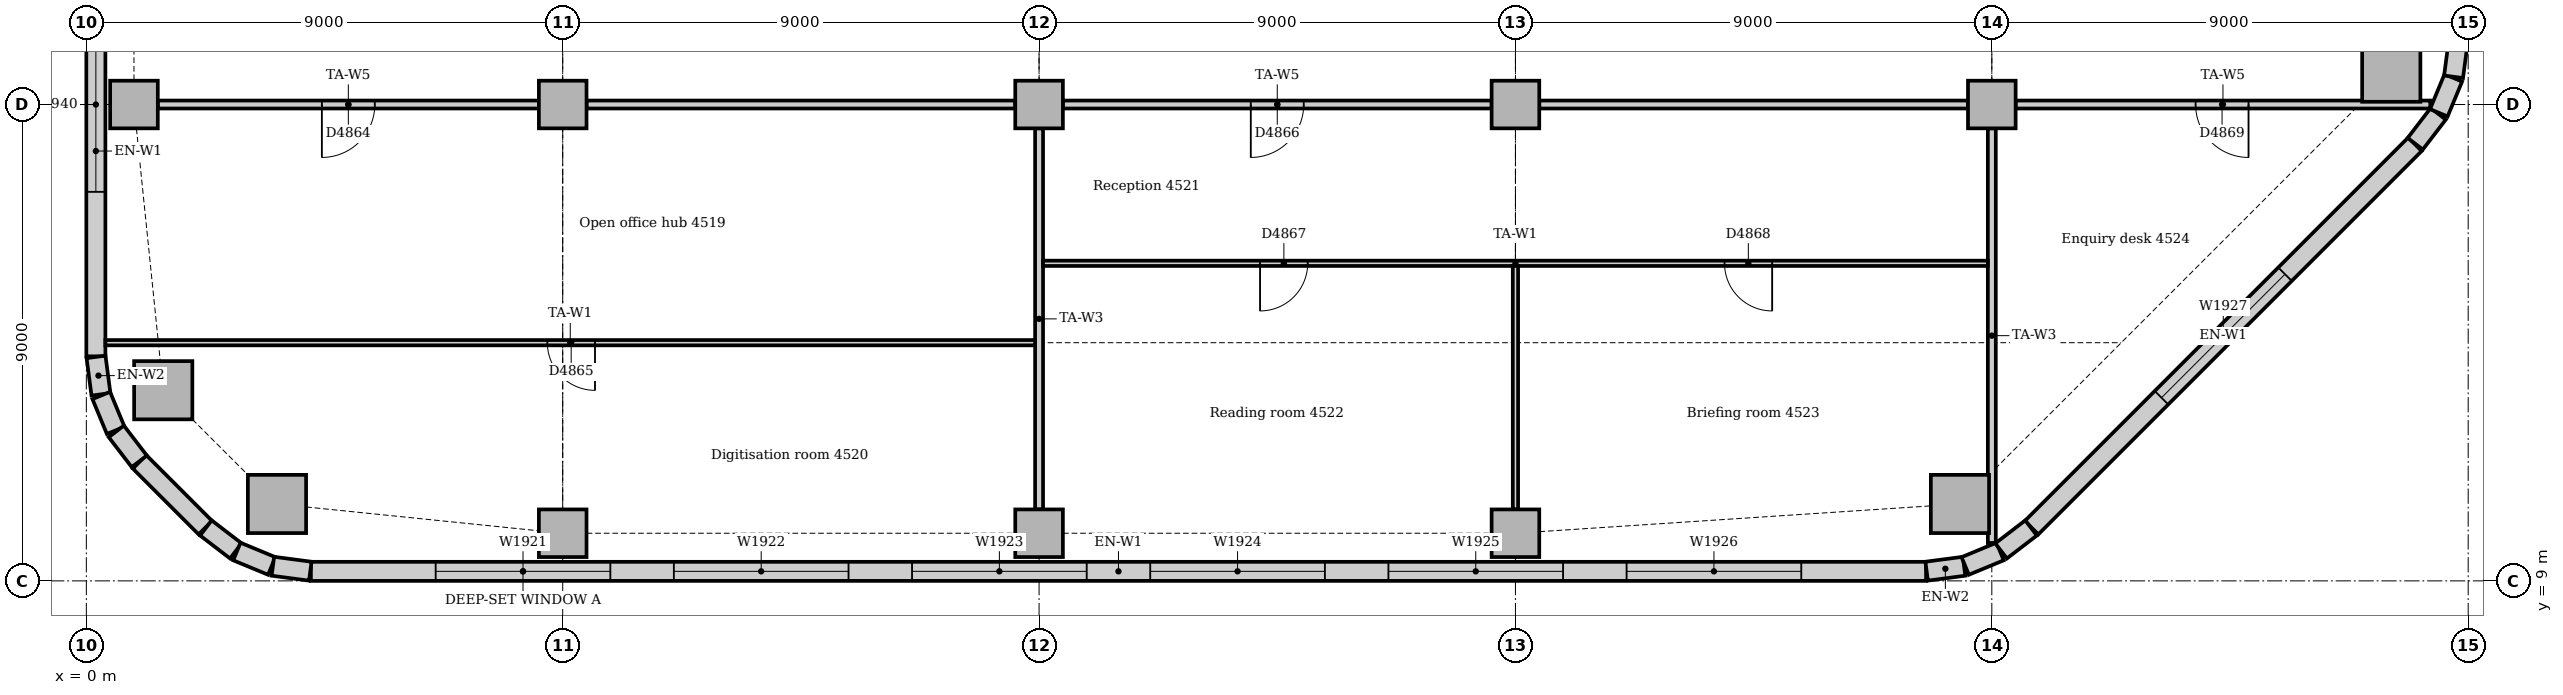
"""IFC4 building model, lengths in metres.
Left out: names, types, materials, properties, quantities, classifications, styles, units other than length and angle.
Written with IfcOpenShell. Run it as: python <this file> out.ifc"""

import sys

from ifc_helpers import new_model, si_unit, direction, frame, frame_2d, origin, origin_2d, place, context, subcontext, project, spatial, rectangle, extrude, element, fill, save


model = new_model("IFC4")
c1 = context("Model", 3, precision=1e-05, world=origin(), true_north=direction((0.0, 1.0)))
c2 = subcontext(c1, "Body", "Model", "MODEL_VIEW")
j1 = project(units=[si_unit("LENGTHUNIT", "METRE"), si_unit("PLANEANGLEUNIT", "RADIAN")], contexts=[c1])
p1 = place(None, origin())
s1 = spatial("IfcSite", under=j1, at=p1, CompositionType="ELEMENT")
p2 = place(p1, origin())
s2 = spatial("IfcBuilding", under=s1, at=p2, CompositionType="ELEMENT")
p3 = place(p2, frame((0.0, 0.0, 189.0)))
s3 = spatial("IfcBuildingStorey", under=s2, at=p3, CompositionType="ELEMENT", Elevation=189.0)
for number, where, z_axis, x_axis in (
    (1, (3.602, 10.453, 0.0), (0.0, 0.0, 1.0), (1.0, 0.0, 0.0)),
    (2, (35.398, 10.453, 0.0), (0.0, 0.0, 1.0), (1.0, 0.0, 0.0)),
    (3, (43.547, 18.602, 0.0), (0.0, 0.0, 1.0), (1.0, 0.0, 0.0)),
    (4, (1.453, 12.602, 0.0), (0.0, 0.0, 1.0), (1.0, 0.0, 0.0)),
):
    element("IfcColumn", number, at=place(p3, frame(where, z_axis=z_axis, x_axis=x_axis)), inside=s3, PredefinedType="COLUMN", context=c2, shape_type="SweptSolid", body=[
        extrude(rectangle(XDim=1.1, YDim=1.1, at=origin_2d()), origin(), (0.0, 0.0, 1.0), 3.7),
    ])
for number, where, z_axis, x_axis in (
    (5, (9.0, 9.9, 0.0), (0.0, 0.0, 1.0), (1.0, 0.0, 0.0)),
    (6, (18.0, 9.9, 0.0), (0.0, 0.0, 1.0), (1.0, 0.0, 0.0)),
    (7, (27.0, 9.9, 0.0), (0.0, 0.0, 1.0), (1.0, 0.0, 0.0)),
    (8, (0.9, 18.0, 0.0), (0.0, 0.0, 1.0), (1.0, 0.0, 0.0)),
    (9, (9.0, 18.0, 0.0), (0.0, 0.0, 1.0), (1.0, 0.0, 0.0)),
    (10, (18.0, 18.0, 0.0), (0.0, 0.0, 1.0), (1.0, 0.0, 0.0)),
    (11, (27.0, 18.0, 0.0), (0.0, 0.0, 1.0), (1.0, 0.0, 0.0)),
    (12, (36.0, 18.0, 0.0), (0.0, 0.0, 1.0), (1.0, 0.0, 0.0)),
):
    element("IfcColumn", number, at=place(p3, frame(where, z_axis=z_axis, x_axis=x_axis)), inside=s3, PredefinedType="COLUMN", context=c2, shape_type="SweptSolid", body=[
        extrude(rectangle(XDim=0.9, YDim=0.9, at=origin_2d()), origin(), (0.0, 0.0, 1.0), 3.7),
    ])
p4 = place(p3, frame((4.243, 9.18, 0.0), z_axis=(0.0, 0.0, 1.0), x_axis=(1.0, 0.0, 0.0)))
e13 = element("IfcWall", 13, at=p4, inside=s3, PredefinedType="STANDARD", context=c2, shape_type="SweptSolid", body=[
    extrude(rectangle(XDim=30.515, YDim=0.36, at=frame_2d((15.257, 0.0))), origin(), (0.0, 0.0, 1.0), 3.7),
])
p5 = place(p4, frame((2.357, 0.0, 0.9)))
e14 = element("IfcOpeningElement", 14, at=p5, cuts=e13, PredefinedType="OPENING", context=c2, shape_type="SweptSolid", body=[
    extrude(rectangle(XDim=3.3, YDim=1.6, at=frame_2d((1.65, 0.8))), frame((0.0, 0.19, 0.0), z_axis=(0.0, -1.0, 0.0), x_axis=(1.0, 0.0, 0.0)), (0.0, 0.0, 1.0), 0.38),
])
p6 = place(p4, frame((6.857, 0.0, 0.9)))
e15 = element("IfcOpeningElement", 15, at=p6, cuts=e13, PredefinedType="OPENING", context=c2, shape_type="SweptSolid", body=[
    extrude(rectangle(XDim=3.3, YDim=1.6, at=frame_2d((1.65, 0.8))), frame((0.0, 0.19, 0.0), z_axis=(0.0, -1.0, 0.0), x_axis=(1.0, 0.0, 0.0)), (0.0, 0.0, 1.0), 0.38),
])
p7 = place(p4, frame((11.357, 0.0, 0.9)))
e16 = element("IfcOpeningElement", 16, at=p7, cuts=e13, PredefinedType="OPENING", context=c2, shape_type="SweptSolid", body=[
    extrude(rectangle(XDim=3.3, YDim=1.6, at=frame_2d((1.65, 0.8))), frame((0.0, 0.19, 0.0), z_axis=(0.0, -1.0, 0.0), x_axis=(1.0, 0.0, 0.0)), (0.0, 0.0, 1.0), 0.38),
])
p8 = place(p4, frame((15.857, 0.0, 0.9)))
e17 = element("IfcOpeningElement", 17, at=p8, cuts=e13, PredefinedType="OPENING", context=c2, shape_type="SweptSolid", body=[
    extrude(rectangle(XDim=3.3, YDim=1.6, at=frame_2d((1.65, 0.8))), frame((0.0, 0.19, 0.0), z_axis=(0.0, -1.0, 0.0), x_axis=(1.0, 0.0, 0.0)), (0.0, 0.0, 1.0), 0.38),
])
p9 = place(p4, frame((20.357, 0.0, 0.9)))
e18 = element("IfcOpeningElement", 18, at=p9, cuts=e13, PredefinedType="OPENING", context=c2, shape_type="SweptSolid", body=[
    extrude(rectangle(XDim=3.3, YDim=1.6, at=frame_2d((1.65, 0.8))), frame((0.0, 0.19, 0.0), z_axis=(0.0, -1.0, 0.0), x_axis=(1.0, 0.0, 0.0)), (0.0, 0.0, 1.0), 0.38),
])
p10 = place(p4, frame((24.857, 0.0, 0.9)))
e19 = element("IfcOpeningElement", 19, at=p10, cuts=e13, PredefinedType="OPENING", context=c2, shape_type="SweptSolid", body=[
    extrude(rectangle(XDim=3.3, YDim=1.6, at=frame_2d((1.65, 0.8))), frame((0.0, 0.19, 0.0), z_axis=(0.0, -1.0, 0.0), x_axis=(1.0, 0.0, 0.0)), (0.0, 0.0, 1.0), 0.38),
])
p11 = place(p3, frame((36.751, 10.006, 0.0), z_axis=(0.0, 0.0, 1.0), x_axis=(0.707106781187, 0.707106781187, 0.0)))
e20 = element("IfcWall", 20, at=p11, inside=s3, PredefinedType="STANDARD", context=c2, shape_type="SweptSolid", body=[
    extrude(rectangle(XDim=10.243, YDim=0.36, at=frame_2d((5.121, 0.0))), origin(), (0.0, 0.0, 1.0), 3.7),
])
p12 = place(p11, frame((3.471, 0.0, 0.9)))
e21 = element("IfcOpeningElement", 21, at=p12, cuts=e20, PredefinedType="OPENING", context=c2, shape_type="SweptSolid", body=[
    extrude(rectangle(XDim=3.3, YDim=1.6, at=frame_2d((1.65, 0.8))), frame((0.0, 0.19, 0.0), z_axis=(0.0, -1.0, 0.0), x_axis=(1.0, 0.0, 0.0)), (0.0, 0.0, 1.0), 0.38),
])
p13 = place(p3, frame((0.18, 21.0, 0.0), z_axis=(0.0, 0.0, 1.0), x_axis=(0.0, -1.0, 0.0)))
e22 = element("IfcWall", 22, at=p13, inside=s3, PredefinedType="STANDARD", context=c2, shape_type="SweptSolid", body=[
    extrude(rectangle(XDim=7.757, YDim=0.36, at=frame_2d((3.879, 0.0))), origin(), (0.0, 0.0, 1.0), 3.7),
])
p14 = place(p13, frame((1.35, 0.0, 0.9)))
e23 = element("IfcOpeningElement", 23, at=p14, cuts=e22, PredefinedType="OPENING", context=c2, shape_type="SweptSolid", body=[
    extrude(rectangle(XDim=3.3, YDim=1.6, at=frame_2d((1.65, 0.8))), frame((0.0, 0.19, 0.0), z_axis=(0.0, -1.0, 0.0), x_axis=(1.0, 0.0, 0.0)), (0.0, 0.0, 1.0), 0.38),
])
p15 = place(p3, frame((1.006, 11.249, 0.0), z_axis=(0.0, 0.0, 1.0), x_axis=(0.707106781187, -0.707106781187, 0.0)))
e24 = element("IfcWall", 24, at=p15, inside=s3, PredefinedType="STANDARD", context=c2, shape_type="SweptSolid", body=[
    extrude(rectangle(XDim=1.757, YDim=0.36, at=frame_2d((0.879, 0.0))), origin(), (0.0, 0.0, 1.0), 3.7),
])
for number, where, z_axis, x_axis in (
    (25, (34.769, 9.183, 0.0), (0.0, 0.0, 1.0), (0.991, 0.131, 0.0)),
    (26, (35.497, 9.282, 0.0), (0.0, 0.0, 1.0), (0.924, 0.383, 0.0)),
):
    element("IfcWall", number, at=place(p3, frame(where, z_axis=z_axis, x_axis=x_axis)), inside=s3, PredefinedType="STANDARD", context=c2, shape_type="SweptSolid", body=[
        extrude(rectangle(XDim=0.713, YDim=0.36, at=frame_2d((0.356, 0.0))), origin(), (0.0, 0.0, 1.0), 3.7),
    ])
for number, where, z_axis, x_axis in (
    (27, (36.175, 9.566, 0.0), (0.0, 0.0, 1.0), (0.793, 0.609, 0.0)),
    (28, (44.0, 17.259, 0.0), (0.0, 0.0, 1.0), (0.609, 0.793, 0.0)),
):
    element("IfcWall", number, at=place(p3, frame(where, z_axis=z_axis, x_axis=x_axis)), inside=s3, PredefinedType="STANDARD", context=c2, shape_type="SweptSolid", body=[
        extrude(rectangle(XDim=0.713, YDim=0.36, at=frame_2d((0.357, 0.0))), origin(), (0.0, 0.0, 1.0), 3.7),
    ])
for number, where, z_axis, x_axis in (
    (29, (44.445, 17.844, 0.0), (0.0, 0.0, 1.0), (0.383, 0.924, 0.0)),
    (30, (44.724, 18.524, 0.0), (0.0, 0.0, 1.0), (0.131, 0.991, 0.0)),
    (31, (0.183, 13.231, 0.0), (0.0, 0.0, 1.0), (0.131, -0.991, 0.0)),
    (32, (0.282, 12.503, 0.0), (0.0, 0.0, 1.0), (0.383, -0.924, 0.0)),
):
    element("IfcWall", number, at=place(p3, frame(where, z_axis=z_axis, x_axis=x_axis)), inside=s3, PredefinedType="STANDARD", context=c2, shape_type="SweptSolid", body=[
        extrude(rectangle(XDim=0.713, YDim=0.36, at=frame_2d((0.356, 0.0))), origin(), (0.0, 0.0, 1.0), 3.7),
    ])
for number, where, z_axis, x_axis in (
    (33, (0.566, 11.825, 0.0), (0.0, 0.0, 1.0), (0.609, -0.793, 0.0)),
    (34, (2.259, 10.0, 0.0), (0.0, 0.0, 1.0), (0.793, -0.609, 0.0)),
):
    element("IfcWall", number, at=place(p3, frame(where, z_axis=z_axis, x_axis=x_axis)), inside=s3, PredefinedType="STANDARD", context=c2, shape_type="SweptSolid", body=[
        extrude(rectangle(XDim=0.713, YDim=0.36, at=frame_2d((0.357, 0.0))), origin(), (0.0, 0.0, 1.0), 3.7),
    ])
for number, where, z_axis, x_axis in (
    (35, (2.844, 9.555, 0.0), (0.0, 0.0, 1.0), (0.924, -0.383, 0.0)),
    (36, (3.524, 9.276, 0.0), (0.0, 0.0, 1.0), (0.991, -0.131, 0.0)),
):
    element("IfcWall", number, at=place(p3, frame(where, z_axis=z_axis, x_axis=x_axis)), inside=s3, PredefinedType="STANDARD", context=c2, shape_type="SweptSolid", body=[
        extrude(rectangle(XDim=0.713, YDim=0.36, at=frame_2d((0.356, 0.0))), origin(), (0.0, 0.0, 1.0), 3.7),
    ])
p16 = place(p3, frame((1.35, 18.0, 0.0), z_axis=(0.0, 0.0, 1.0), x_axis=(1.0, 0.0, 0.0)))
e37 = element("IfcWall", 37, at=p16, inside=s3, PredefinedType="PARTITIONING", context=c2, shape_type="SweptSolid", body=[
    extrude(rectangle(XDim=7.2, YDim=0.15, at=frame_2d((3.6, 0.0))), origin(), (0.0, 0.0, 1.0), 3.112),
])
p17 = place(p16, frame((3.1, 0.0, 0.0)))
e38 = element("IfcOpeningElement", 38, at=p17, cuts=e37, PredefinedType="OPENING", context=c2, shape_type="SweptSolid", body=[
    extrude(rectangle(XDim=1.0, YDim=2.1, at=frame_2d((0.5, 1.05))), frame((0.0, 0.085, 0.0), z_axis=(0.0, -1.0, 0.0), x_axis=(1.0, 0.0, 0.0)), (0.0, 0.0, 1.0), 0.17),
])
p18 = place(p3, frame((9.45, 18.0, 0.0), z_axis=(0.0, 0.0, 1.0), x_axis=(1.0, 0.0, 0.0)))
e39 = element("IfcWall", 39, at=p18, inside=s3, PredefinedType="PARTITIONING", context=c2, shape_type="SweptSolid", body=[
    extrude(rectangle(XDim=8.1, YDim=0.15, at=frame_2d((4.05, 0.0))), origin(), (0.0, 0.0, 1.0), 3.112),
])
p19 = place(p3, frame((18.45, 18.0, 0.0), z_axis=(0.0, 0.0, 1.0), x_axis=(1.0, 0.0, 0.0)))
e40 = element("IfcWall", 40, at=p19, inside=s3, PredefinedType="PARTITIONING", context=c2, shape_type="SweptSolid", body=[
    extrude(rectangle(XDim=8.1, YDim=0.15, at=frame_2d((4.05, 0.0))), origin(), (0.0, 0.0, 1.0), 3.112),
])
p20 = place(p19, frame((3.55, 0.0, 0.0)))
e41 = element("IfcOpeningElement", 41, at=p20, cuts=e40, PredefinedType="OPENING", context=c2, shape_type="SweptSolid", body=[
    extrude(rectangle(XDim=1.0, YDim=2.1, at=frame_2d((0.5, 1.05))), frame((0.0, 0.085, 0.0), z_axis=(0.0, -1.0, 0.0), x_axis=(1.0, 0.0, 0.0)), (0.0, 0.0, 1.0), 0.17),
])
p21 = place(p3, frame((27.45, 18.0, 0.0), z_axis=(0.0, 0.0, 1.0), x_axis=(1.0, 0.0, 0.0)))
e42 = element("IfcWall", 42, at=p21, inside=s3, PredefinedType="PARTITIONING", context=c2, shape_type="SweptSolid", body=[
    extrude(rectangle(XDim=8.1, YDim=0.15, at=frame_2d((4.05, 0.0))), origin(), (0.0, 0.0, 1.0), 3.112),
])
p22 = place(p3, frame((36.45, 18.0, 0.0), z_axis=(0.0, 0.0, 1.0), x_axis=(1.0, 0.0, 0.0)))
e43 = element("IfcWall", 43, at=p22, inside=s3, PredefinedType="PARTITIONING", context=c2, shape_type="SweptSolid", body=[
    extrude(rectangle(XDim=7.834, YDim=0.15, at=frame_2d((3.917, 0.0))), origin(), (0.0, 0.0, 1.0), 3.2),
])
p23 = place(p22, frame((3.4, 0.0, 0.0)))
e44 = element("IfcOpeningElement", 44, at=p23, cuts=e43, PredefinedType="OPENING", context=c2, shape_type="SweptSolid", body=[
    extrude(rectangle(XDim=1.0, YDim=2.1, at=frame_2d((0.5, 1.05))), frame((0.0, 0.085, 0.0), z_axis=(0.0, -1.0, 0.0), x_axis=(1.0, 0.0, 0.0)), (0.0, 0.0, 1.0), 0.17),
])
p24 = place(p3, frame((18.0, 10.35, 0.0), z_axis=(0.0, 0.0, 1.0), x_axis=(0.0, 1.0, 0.0)))
e45 = element("IfcWall", 45, at=p24, inside=s3, PredefinedType="PARTITIONING", context=c2, shape_type="SweptSolid", body=[
    extrude(rectangle(XDim=7.2, YDim=0.15, at=frame_2d((3.6, 0.0))), origin(), (0.0, 0.0, 1.0), 3.212),
])
p25 = place(p3, frame((36.0, 9.716, 0.0), z_axis=(0.0, 0.0, 1.0), x_axis=(0.0, 1.0, 0.0)))
e46 = element("IfcWall", 46, at=p25, inside=s3, PredefinedType="PARTITIONING", context=c2, shape_type="SweptSolid", body=[
    extrude(rectangle(XDim=7.834, YDim=0.15, at=frame_2d((3.917, 0.0))), origin(), (0.0, 0.0, 1.0), 3.2),
])
p26 = place(p3, frame((18.075, 15.0, 0.0), z_axis=(0.0, 0.0, 1.0), x_axis=(1.0, 0.0, 0.0)))
e47 = element("IfcWall", 47, at=p26, inside=s3, PredefinedType="PARTITIONING", context=c2, shape_type="SweptSolid", body=[
    extrude(rectangle(XDim=17.85, YDim=0.1, at=frame_2d((8.925, 0.0))), origin(), (0.0, 0.0, 1.0), 3.7),
])
p27 = place(p26, frame((4.1, 0.0, 0.0)))
e48 = element("IfcOpeningElement", 48, at=p27, cuts=e47, PredefinedType="OPENING", context=c2, shape_type="SweptSolid", body=[
    extrude(rectangle(XDim=0.9, YDim=2.1, at=frame_2d((0.45, 1.05))), frame((0.0, 0.06, 0.0), z_axis=(0.0, -1.0, 0.0), x_axis=(1.0, 0.0, 0.0)), (0.0, 0.0, 1.0), 0.12),
])
p28 = place(p26, frame((12.875, 0.0, 0.0)))
e49 = element("IfcOpeningElement", 49, at=p28, cuts=e47, PredefinedType="OPENING", context=c2, shape_type="SweptSolid", body=[
    extrude(rectangle(XDim=0.9, YDim=2.1, at=frame_2d((0.45, 1.05))), frame((0.0, 0.06, 0.0), z_axis=(0.0, -1.0, 0.0), x_axis=(1.0, 0.0, 0.0)), (0.0, 0.0, 1.0), 0.12),
])
p29 = place(p3, frame((0.36, 13.5, 0.0), z_axis=(0.0, 0.0, 1.0), x_axis=(1.0, 0.0, 0.0)))
e50 = element("IfcWall", 50, at=p29, inside=s3, PredefinedType="PARTITIONING", context=c2, shape_type="SweptSolid", body=[
    extrude(rectangle(XDim=17.565, YDim=0.1, at=frame_2d((8.783, 0.0))), origin(), (0.0, 0.0, 1.0), 3.25),
])
p30 = place(p29, frame((8.35, 0.0, 0.0)))
e51 = element("IfcOpeningElement", 51, at=p30, cuts=e50, PredefinedType="OPENING", context=c2, shape_type="SweptSolid", body=[
    extrude(rectangle(XDim=0.9, YDim=2.1, at=frame_2d((0.45, 1.05))), frame((0.0, 0.06, 0.0), z_axis=(0.0, -1.0, 0.0), x_axis=(1.0, 0.0, 0.0)), (0.0, 0.0, 1.0), 0.12),
])
p31 = place(p3, frame((27.0, 10.35, 0.0), z_axis=(0.0, 0.0, 1.0), x_axis=(0.0, 1.0, 0.0)))
e52 = element("IfcWall", 52, at=p31, inside=s3, PredefinedType="PARTITIONING", context=c2, shape_type="SweptSolid", body=[
    extrude(rectangle(XDim=4.6, YDim=0.1, at=frame_2d((2.3, 0.0))), origin(), (0.0, 0.0, 1.0), 3.212),
])
p32 = place(p5, origin())
e53 = element("IfcWindow", 53, at=p32, inside=s3, PartitioningType="SINGLE_PANEL", PredefinedType="WINDOW", context=c2, shape_type="SweptSolid", body=[
    extrude(rectangle(XDim=3.3, YDim=1.6, at=frame_2d((1.65, 0.8))), frame((0.0, 0.13, 0.0), z_axis=(0.0, -1.0, 0.0), x_axis=(1.0, 0.0, 0.0)), (0.0, 0.0, 1.0), 0.06),
])
fill(e14, e53)
p33 = place(p6, origin())
e54 = element("IfcWindow", 54, at=p33, inside=s3, PartitioningType="SINGLE_PANEL", PredefinedType="WINDOW", context=c2, shape_type="SweptSolid", body=[
    extrude(rectangle(XDim=3.3, YDim=1.6, at=frame_2d((1.65, 0.8))), frame((0.0, 0.13, 0.0), z_axis=(0.0, -1.0, 0.0), x_axis=(1.0, 0.0, 0.0)), (0.0, 0.0, 1.0), 0.06),
])
fill(e15, e54)
p34 = place(p7, origin())
e55 = element("IfcWindow", 55, at=p34, inside=s3, PartitioningType="SINGLE_PANEL", PredefinedType="WINDOW", context=c2, shape_type="SweptSolid", body=[
    extrude(rectangle(XDim=3.3, YDim=1.6, at=frame_2d((1.65, 0.8))), frame((0.0, 0.13, 0.0), z_axis=(0.0, -1.0, 0.0), x_axis=(1.0, 0.0, 0.0)), (0.0, 0.0, 1.0), 0.06),
])
fill(e16, e55)
p35 = place(p8, origin())
e56 = element("IfcWindow", 56, at=p35, inside=s3, PartitioningType="SINGLE_PANEL", PredefinedType="WINDOW", context=c2, shape_type="SweptSolid", body=[
    extrude(rectangle(XDim=3.3, YDim=1.6, at=frame_2d((1.65, 0.8))), frame((0.0, 0.13, 0.0), z_axis=(0.0, -1.0, 0.0), x_axis=(1.0, 0.0, 0.0)), (0.0, 0.0, 1.0), 0.06),
])
fill(e17, e56)
p36 = place(p9, origin())
e57 = element("IfcWindow", 57, at=p36, inside=s3, PartitioningType="SINGLE_PANEL", PredefinedType="WINDOW", context=c2, shape_type="SweptSolid", body=[
    extrude(rectangle(XDim=3.3, YDim=1.6, at=frame_2d((1.65, 0.8))), frame((0.0, 0.13, 0.0), z_axis=(0.0, -1.0, 0.0), x_axis=(1.0, 0.0, 0.0)), (0.0, 0.0, 1.0), 0.06),
])
fill(e18, e57)
p37 = place(p10, origin())
e58 = element("IfcWindow", 58, at=p37, inside=s3, PartitioningType="SINGLE_PANEL", PredefinedType="WINDOW", context=c2, shape_type="SweptSolid", body=[
    extrude(rectangle(XDim=3.3, YDim=1.6, at=frame_2d((1.65, 0.8))), frame((0.0, 0.13, 0.0), z_axis=(0.0, -1.0, 0.0), x_axis=(1.0, 0.0, 0.0)), (0.0, 0.0, 1.0), 0.06),
])
fill(e19, e58)
p38 = place(p12, origin())
e59 = element("IfcWindow", 59, at=p38, inside=s3, PartitioningType="SINGLE_PANEL", PredefinedType="WINDOW", context=c2, shape_type="SweptSolid", body=[
    extrude(rectangle(XDim=3.3, YDim=1.6, at=frame_2d((1.65, 0.8))), frame((0.0, 0.13, 0.0), z_axis=(0.0, -1.0, 0.0), x_axis=(1.0, 0.0, 0.0)), (0.0, 0.0, 1.0), 0.06),
])
fill(e21, e59)
p39 = place(p14, origin())
e60 = element("IfcWindow", 60, at=p39, inside=s3, PartitioningType="SINGLE_PANEL", PredefinedType="WINDOW", context=c2, shape_type="SweptSolid", body=[
    extrude(rectangle(XDim=3.3, YDim=1.6, at=frame_2d((1.65, 0.8))), frame((0.0, 0.13, 0.0), z_axis=(0.0, -1.0, 0.0), x_axis=(1.0, 0.0, 0.0)), (0.0, 0.0, 1.0), 0.06),
])
fill(e23, e60)
p40 = place(p17, frame((1.0, 0.0, 0.0), z_axis=(0.0, 0.0, 1.0), x_axis=(-1.0, 0.0, 0.0)))
e61 = element("IfcDoor", 61, at=p40, inside=s3, OperationType="SINGLE_SWING_RIGHT", PredefinedType="DOOR", context=c2, shape_type="SweptSolid", body=[
    extrude(rectangle(XDim=1.0, YDim=2.1, at=frame_2d((0.5, 1.05))), frame((0.0, 0.025, 0.0), z_axis=(0.0, -1.0, 0.0), x_axis=(1.0, 0.0, 0.0)), (0.0, 0.0, 1.0), 0.05),
])
fill(e38, e61)
p41 = place(p30, frame((0.9, 0.0, 0.0), z_axis=(0.0, 0.0, 1.0), x_axis=(-1.0, 0.0, 0.0)))
e62 = element("IfcDoor", 62, at=p41, inside=s3, OperationType="SINGLE_SWING_LEFT", PredefinedType="DOOR", context=c2, shape_type="SweptSolid", body=[
    extrude(rectangle(XDim=0.9, YDim=2.1, at=frame_2d((0.45, 1.05))), frame((0.0, 0.025, 0.0), z_axis=(0.0, -1.0, 0.0), x_axis=(1.0, 0.0, 0.0)), (0.0, 0.0, 1.0), 0.05),
])
fill(e51, e62)
p42 = place(p20, frame((1.0, 0.0, 0.0), z_axis=(0.0, 0.0, 1.0), x_axis=(-1.0, 0.0, 0.0)))
e63 = element("IfcDoor", 63, at=p42, inside=s3, OperationType="SINGLE_SWING_RIGHT", PredefinedType="DOOR", context=c2, shape_type="SweptSolid", body=[
    extrude(rectangle(XDim=1.0, YDim=2.1, at=frame_2d((0.5, 1.05))), frame((0.0, 0.025, 0.0), z_axis=(0.0, -1.0, 0.0), x_axis=(1.0, 0.0, 0.0)), (0.0, 0.0, 1.0), 0.05),
])
fill(e41, e63)
p43 = place(p27, frame((0.9, 0.0, 0.0), z_axis=(0.0, 0.0, 1.0), x_axis=(-1.0, 0.0, 0.0)))
e64 = element("IfcDoor", 64, at=p43, inside=s3, OperationType="SINGLE_SWING_RIGHT", PredefinedType="DOOR", context=c2, shape_type="SweptSolid", body=[
    extrude(rectangle(XDim=0.9, YDim=2.1, at=frame_2d((0.45, 1.05))), frame((0.0, 0.025, 0.0), z_axis=(0.0, -1.0, 0.0), x_axis=(1.0, 0.0, 0.0)), (0.0, 0.0, 1.0), 0.05),
])
fill(e48, e64)
p44 = place(p28, frame((0.9, 0.0, 0.0), z_axis=(0.0, 0.0, 1.0), x_axis=(-1.0, 0.0, 0.0)))
e65 = element("IfcDoor", 65, at=p44, inside=s3, OperationType="SINGLE_SWING_LEFT", PredefinedType="DOOR", context=c2, shape_type="SweptSolid", body=[
    extrude(rectangle(XDim=0.9, YDim=2.1, at=frame_2d((0.45, 1.05))), frame((0.0, 0.025, 0.0), z_axis=(0.0, -1.0, 0.0), x_axis=(1.0, 0.0, 0.0)), (0.0, 0.0, 1.0), 0.05),
])
fill(e49, e65)
p45 = place(p23, frame((1.0, 0.0, 0.0), z_axis=(0.0, 0.0, 1.0), x_axis=(-1.0, 0.0, 0.0)))
e66 = element("IfcDoor", 66, at=p45, inside=s3, OperationType="SINGLE_SWING_LEFT", PredefinedType="DOOR", context=c2, shape_type="SweptSolid", body=[
    extrude(rectangle(XDim=1.0, YDim=2.1, at=frame_2d((0.5, 1.05))), frame((0.0, 0.025, 0.0), z_axis=(0.0, -1.0, 0.0), x_axis=(1.0, 0.0, 0.0)), (0.0, 0.0, 1.0), 0.05),
])
fill(e44, e66)
save(model, sys.argv[1])
